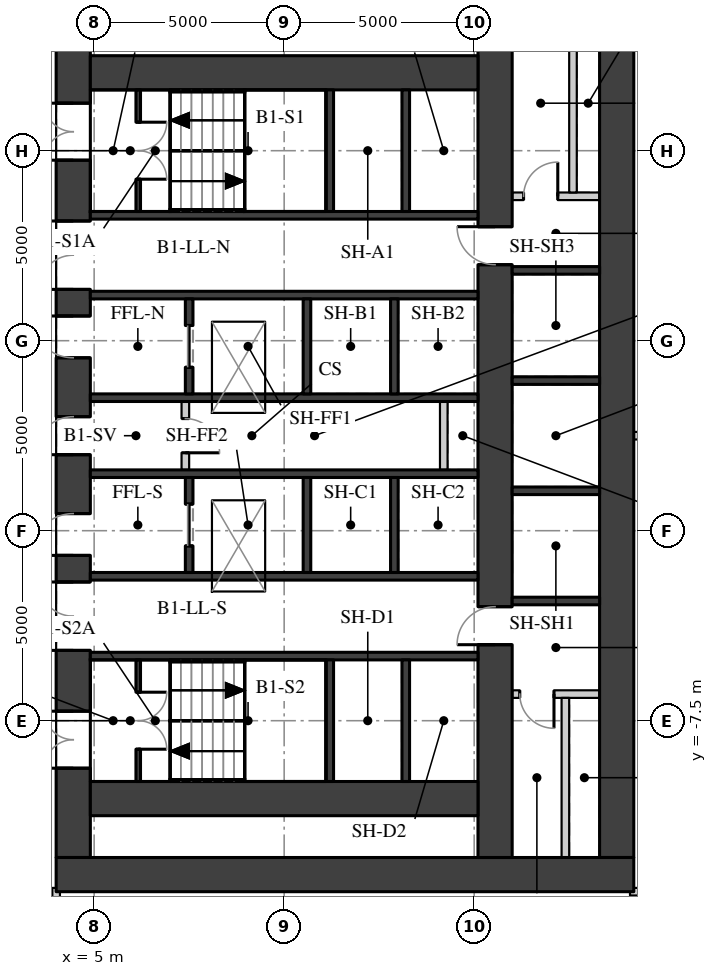
"""IFC4 building model, lengths in metres.
Left out: names, types, materials, properties, quantities, classifications, styles, units other than length and angle.
Written with IfcOpenShell. Run it as: python <this file> out.ifc"""

import sys

from ifc_helpers import new_model, si_unit, direction, frame, frame_2d, origin, place, context, subcontext, project, spatial, rectangle, extrude, element, fill, save


model = new_model("IFC4")
c1 = context("Model", 3, precision=1e-05, world=origin(), true_north=direction((0.0, 1.0)))
c2 = subcontext(c1, "Body", "Model", "MODEL_VIEW")
j1 = project(units=[si_unit("LENGTHUNIT", "METRE"), si_unit("PLANEANGLEUNIT", "RADIAN")], contexts=[c1])
p1 = place(None, origin())
s1 = spatial("IfcSite", under=j1, at=p1, CompositionType="ELEMENT")
p2 = place(p1, origin())
s2 = spatial("IfcBuilding", under=s1, at=p2, CompositionType="ELEMENT")
p3 = place(p2, frame((0.0, 0.0, -5.2)))
s3 = spatial("IfcBuildingStorey", under=s2, at=p3, CompositionType="ELEMENT", Elevation=-5.2)
p4 = place(p3, frame((4.45, -11.1, 0.0), z_axis=(0.0, 0.0, 1.0), x_axis=(0.0, 1.0, 0.0)))
e1 = element("IfcWall", 1, at=p4, inside=s3, PredefinedType="SHEAR", context=c2, shape_type="SweptSolid", body=[
    extrude(rectangle(XDim=22.2, YDim=0.9, at=frame_2d((11.1, 0.0))), origin(), (0.0, 0.0, 1.0), 4.79),
])
p5 = place(p4, frame((2.35, 0.0, 0.0)))
e2 = element("IfcOpeningElement", 2, at=p5, cuts=e1, PredefinedType="OPENING", context=c2, shape_type="SweptSolid", body=[
    extrude(rectangle(XDim=1.5, YDim=2.1, at=frame_2d((0.75, 1.05))), frame((0.0, 0.46, 0.0), z_axis=(0.0, -1.0, 0.0), x_axis=(1.0, 0.0, 0.0)), (0.0, 0.0, 1.0), 0.92),
])
p6 = place(p4, frame((5.45, 0.0, 0.0)))
e3 = element("IfcOpeningElement", 3, at=p6, cuts=e1, PredefinedType="OPENING", context=c2, shape_type="SweptSolid", body=[
    extrude(rectangle(XDim=1.8, YDim=2.1, at=frame_2d((0.9, 1.05))), frame((0.0, 0.46, 0.0), z_axis=(0.0, -1.0, 0.0), x_axis=(1.0, 0.0, 0.0)), (0.0, 0.0, 1.0), 0.92),
])
p7 = place(p4, frame((7.95, 0.0, 0.0)))
e4 = element("IfcOpeningElement", 4, at=p7, cuts=e1, PredefinedType="OPENING", context=c2, shape_type="SweptSolid", body=[
    extrude(rectangle(XDim=1.1, YDim=2.1, at=frame_2d((0.55, 1.05))), frame((0.0, 0.46, 0.0), z_axis=(0.0, -1.0, 0.0), x_axis=(1.0, 0.0, 0.0)), (0.0, 0.0, 1.0), 0.92),
])
p8 = place(p4, frame((10.6, 0.0, 0.0)))
e5 = element("IfcOpeningElement", 5, at=p8, cuts=e1, PredefinedType="OPENING", context=c2, shape_type="SweptSolid", body=[
    extrude(rectangle(XDim=1.0, YDim=2.1, at=frame_2d((0.5, 1.05))), frame((0.0, 0.46, 0.0), z_axis=(0.0, -1.0, 0.0), x_axis=(1.0, 0.0, 0.0)), (0.0, 0.0, 1.0), 0.92),
])
p9 = place(p4, frame((13.15, 0.0, 0.0)))
e6 = element("IfcOpeningElement", 6, at=p9, cuts=e1, PredefinedType="OPENING", context=c2, shape_type="SweptSolid", body=[
    extrude(rectangle(XDim=1.1, YDim=2.1, at=frame_2d((0.55, 1.05))), frame((0.0, 0.46, 0.0), z_axis=(0.0, -1.0, 0.0), x_axis=(1.0, 0.0, 0.0)), (0.0, 0.0, 1.0), 0.92),
])
p10 = place(p4, frame((14.95, 0.0, 0.0)))
e7 = element("IfcOpeningElement", 7, at=p10, cuts=e1, PredefinedType="OPENING", context=c2, shape_type="SweptSolid", body=[
    extrude(rectangle(XDim=1.8, YDim=2.1, at=frame_2d((0.9, 1.05))), frame((0.0, 0.46, 0.0), z_axis=(0.0, -1.0, 0.0), x_axis=(1.0, 0.0, 0.0)), (0.0, 0.0, 1.0), 0.92),
])
p11 = place(p4, frame((18.35, 0.0, 0.0)))
e8 = element("IfcOpeningElement", 8, at=p11, cuts=e1, PredefinedType="OPENING", context=c2, shape_type="SweptSolid", body=[
    extrude(rectangle(XDim=1.5, YDim=2.1, at=frame_2d((0.75, 1.05))), frame((0.0, 0.46, 0.0), z_axis=(0.0, -1.0, 0.0), x_axis=(1.0, 0.0, 0.0)), (0.0, 0.0, 1.0), 0.92),
])
p12 = place(p3, frame((18.75, -11.1, 0.0), z_axis=(0.0, 0.0, 1.0), x_axis=(0.0, 1.0, 0.0)))
e9 = element("IfcWall", 9, at=p12, inside=s3, PredefinedType="SHEAR", context=c2, shape_type="SweptSolid", body=[
    extrude(rectangle(XDim=22.2, YDim=0.9, at=frame_2d((11.1, 0.0))), origin(), (0.0, 0.0, 1.0), 4.79),
])
p13 = place(p3, frame((4.0, -11.55, 0.0), z_axis=(0.0, 0.0, 1.0), x_axis=(1.0, 0.0, 0.0)))
e10 = element("IfcWall", 10, at=p13, inside=s3, PredefinedType="SHEAR", context=c2, shape_type="SweptSolid", body=[
    extrude(rectangle(XDim=15.2, YDim=0.9, at=frame_2d((7.6, 0.0))), origin(), (0.0, 0.0, 1.0), 4.79),
])
p14 = place(p3, frame((15.55, -11.1, 0.0), z_axis=(0.0, 0.0, 1.0), x_axis=(0.0, 1.0, 0.0)))
e11 = element("IfcWall", 11, at=p14, inside=s3, PredefinedType="SHEAR", context=c2, shape_type="SweptSolid", body=[
    extrude(rectangle(XDim=22.2, YDim=0.9, at=frame_2d((11.1, 0.0))), origin(), (0.0, 0.0, 1.0), 4.79),
])
p15 = place(p14, frame((15.6, 0.0, 0.0)))
e12 = element("IfcOpeningElement", 12, at=p15, cuts=e11, PredefinedType="OPENING", context=c2, shape_type="SweptSolid", body=[
    extrude(rectangle(XDim=1.0, YDim=2.1, at=frame_2d((0.5, 1.05))), frame((0.0, 0.46, 0.0), z_axis=(0.0, -1.0, 0.0), x_axis=(1.0, 0.0, 0.0)), (0.0, 0.0, 1.0), 0.92),
])
p16 = place(p14, frame((5.6, 0.0, 0.0)))
e13 = element("IfcOpeningElement", 13, at=p16, cuts=e11, PredefinedType="OPENING", context=c2, shape_type="SweptSolid", body=[
    extrude(rectangle(XDim=1.0, YDim=2.1, at=frame_2d((0.5, 1.05))), frame((0.0, 0.46, 0.0), z_axis=(0.0, -1.0, 0.0), x_axis=(1.0, 0.0, 0.0)), (0.0, 0.0, 1.0), 0.92),
])
for number, where, z_axis, x_axis in (
    (14, (4.9, 9.55, 0.0), (0.0, 0.0, 1.0), (1.0, 0.0, 0.0)),
    (15, (4.9, -9.55, 0.0), (0.0, 0.0, 1.0), (1.0, 0.0, 0.0)),
):
    element("IfcWall", number, at=place(p3, frame(where, z_axis=z_axis, x_axis=x_axis)), inside=s3, PredefinedType="SHEAR", context=c2, shape_type="SweptSolid", body=[
        extrude(rectangle(XDim=10.2, YDim=0.9, at=frame_2d((5.1, 0.0))), origin(), (0.0, 0.0, 1.0), 4.79),
    ])
for number, where, z_axis, x_axis in (
    (16, (4.9, 5.8, 0.0), (0.0, 0.0, 1.0), (1.0, 0.0, 0.0)),
    (17, (4.9, 3.7, 0.0), (0.0, 0.0, 1.0), (1.0, 0.0, 0.0)),
    (18, (4.9, 1.0, 0.0), (0.0, 0.0, 1.0), (1.0, 0.0, 0.0)),
    (19, (4.9, -1.0, 0.0), (0.0, 0.0, 1.0), (1.0, 0.0, 0.0)),
    (20, (4.9, -3.7, 0.0), (0.0, 0.0, 1.0), (1.0, 0.0, 0.0)),
    (21, (4.9, -5.8, 0.0), (0.0, 0.0, 1.0), (1.0, 0.0, 0.0)),
):
    element("IfcWall", number, at=place(p3, frame(where, z_axis=z_axis, x_axis=x_axis)), inside=s3, PredefinedType="SHEAR", context=c2, shape_type="SweptSolid", body=[
        extrude(rectangle(XDim=10.2, YDim=0.2, at=frame_2d((5.1, 0.0))), origin(), (0.0, 0.0, 1.0), 4.79),
    ])
for number, where, z_axis, x_axis in (
    (22, (11.2, 5.9, 0.0), (0.0, 0.0, 1.0), (0.0, 1.0, 0.0)),
    (23, (11.2, -9.1, 0.0), (0.0, 0.0, 1.0), (0.0, 1.0, 0.0)),
    (24, (13.2, 5.9, 0.0), (0.0, 0.0, 1.0), (0.0, 1.0, 0.0)),
    (25, (13.2, -9.1, 0.0), (0.0, 0.0, 1.0), (0.0, 1.0, 0.0)),
):
    element("IfcWall", number, at=place(p3, frame(where, z_axis=z_axis, x_axis=x_axis)), inside=s3, PredefinedType="SHEAR", context=c2, shape_type="SweptSolid", body=[
        extrude(rectangle(XDim=3.2, YDim=0.2, at=frame_2d((1.6, 0.0))), origin(), (0.0, 0.0, 1.0), 4.79),
    ])
p17 = place(p3, frame((7.5, 1.1, 0.0), z_axis=(0.0, 0.0, 1.0), x_axis=(0.0, 1.0, 0.0)))
e26 = element("IfcWall", 26, at=p17, inside=s3, PredefinedType="SHEAR", context=c2, shape_type="SweptSolid", body=[
    extrude(rectangle(XDim=2.5, YDim=0.2, at=frame_2d((1.25, 0.0))), origin(), (0.0, 0.0, 1.0), 4.79),
])
p18 = place(p17, frame((0.7, 0.0, 0.0)))
e27 = element("IfcOpeningElement", 27, at=p18, cuts=e26, PredefinedType="OPENING", context=c2, shape_type="SweptSolid", body=[
    extrude(rectangle(XDim=1.1, YDim=2.1, at=frame_2d((0.55, 1.05))), frame((0.0, 0.11, 0.0), z_axis=(0.0, -1.0, 0.0), x_axis=(1.0, 0.0, 0.0)), (0.0, 0.0, 1.0), 0.22),
])
p19 = place(p3, frame((7.5, -3.6, 0.0), z_axis=(0.0, 0.0, 1.0), x_axis=(0.0, 1.0, 0.0)))
e28 = element("IfcWall", 28, at=p19, inside=s3, PredefinedType="SHEAR", context=c2, shape_type="SweptSolid", body=[
    extrude(rectangle(XDim=2.5, YDim=0.2, at=frame_2d((1.25, 0.0))), origin(), (0.0, 0.0, 1.0), 4.79),
])
p20 = place(p19, frame((0.7, 0.0, 0.0)))
e29 = element("IfcOpeningElement", 29, at=p20, cuts=e28, PredefinedType="OPENING", context=c2, shape_type="SweptSolid", body=[
    extrude(rectangle(XDim=1.1, YDim=2.1, at=frame_2d((0.55, 1.05))), frame((0.0, 0.11, 0.0), z_axis=(0.0, -1.0, 0.0), x_axis=(1.0, 0.0, 0.0)), (0.0, 0.0, 1.0), 0.22),
])
for number, where, z_axis, x_axis in (
    (30, (10.6, 1.1, 0.0), (0.0, 0.0, 1.0), (0.0, 1.0, 0.0)),
    (31, (10.6, -3.6, 0.0), (0.0, 0.0, 1.0), (0.0, 1.0, 0.0)),
    (32, (12.9, 1.1, 0.0), (0.0, 0.0, 1.0), (0.0, 1.0, 0.0)),
    (33, (12.9, -3.6, 0.0), (0.0, 0.0, 1.0), (0.0, 1.0, 0.0)),
):
    element("IfcWall", number, at=place(p3, frame(where, z_axis=z_axis, x_axis=x_axis)), inside=s3, PredefinedType="SHEAR", context=c2, shape_type="SweptSolid", body=[
        extrude(rectangle(XDim=2.5, YDim=0.2, at=frame_2d((1.25, 0.0))), origin(), (0.0, 0.0, 1.0), 4.79),
    ])
p21 = place(p3, frame((6.16, 5.9, 0.0), z_axis=(0.0, 0.0, 1.0), x_axis=(0.0, 1.0, 0.0)))
e34 = element("IfcWall", 34, at=p21, inside=s3, PredefinedType="SHEAR", context=c2, shape_type="SweptSolid", body=[
    extrude(rectangle(XDim=3.2, YDim=0.12, at=frame_2d((1.6, 0.0))), origin(), (0.0, 0.0, 1.0), 2.39),
])
p22 = place(p21, frame((0.85, 0.0, 0.0)))
e35 = element("IfcOpeningElement", 35, at=p22, cuts=e34, PredefinedType="OPENING", context=c2, shape_type="SweptSolid", body=[
    extrude(rectangle(XDim=1.5, YDim=2.1, at=frame_2d((0.75, 1.05))), frame((0.0, 0.07, 0.0), z_axis=(0.0, -1.0, 0.0), x_axis=(1.0, 0.0, 0.0)), (0.0, 0.0, 1.0), 0.14),
])
p23 = place(p3, frame((6.16, -9.1, 0.0), z_axis=(0.0, 0.0, 1.0), x_axis=(0.0, 1.0, 0.0)))
e36 = element("IfcWall", 36, at=p23, inside=s3, PredefinedType="SHEAR", context=c2, shape_type="SweptSolid", body=[
    extrude(rectangle(XDim=3.2, YDim=0.12, at=frame_2d((1.6, 0.0))), origin(), (0.0, 0.0, 1.0), 2.39),
])
p24 = place(p23, frame((0.85, 0.0, 0.0)))
e37 = element("IfcOpeningElement", 37, at=p24, cuts=e36, PredefinedType="OPENING", context=c2, shape_type="SweptSolid", body=[
    extrude(rectangle(XDim=1.5, YDim=2.1, at=frame_2d((0.75, 1.05))), frame((0.0, 0.07, 0.0), z_axis=(0.0, -1.0, 0.0), x_axis=(1.0, 0.0, 0.0)), (0.0, 0.0, 1.0), 0.14),
])
p25 = place(p3, frame((7.4, -0.9, 0.0), z_axis=(0.0, 0.0, 1.0), x_axis=(0.0, 1.0, 0.0)))
e38 = element("IfcWall", 38, at=p25, inside=s3, PredefinedType="PARTITIONING", context=c2, shape_type="SweptSolid", body=[
    extrude(rectangle(XDim=1.8, YDim=0.2, at=frame_2d((0.9, 0.0))), origin(), (0.0, 0.0, 1.0), 4.79),
])
p26 = place(p25, frame((0.45, 0.0, 0.0)))
e39 = element("IfcOpeningElement", 39, at=p26, cuts=e38, PredefinedType="OPENING", context=c2, shape_type="SweptSolid", body=[
    extrude(rectangle(XDim=0.9, YDim=2.1, at=frame_2d((0.45, 1.05))), frame((0.0, 0.11, 0.0), z_axis=(0.0, -1.0, 0.0), x_axis=(1.0, 0.0, 0.0)), (0.0, 0.0, 1.0), 0.22),
])
p27 = place(p3, frame((14.2, -0.9, 0.0), z_axis=(0.0, 0.0, 1.0), x_axis=(0.0, 1.0, 0.0)))
e40 = element("IfcWall", 40, at=p27, inside=s3, PredefinedType="PARTITIONING", context=c2, shape_type="SweptSolid", body=[
    extrude(rectangle(XDim=1.8, YDim=0.2, at=frame_2d((0.9, 0.0))), origin(), (0.0, 0.0, 1.0), 4.79),
])
for number, where, z_axis, x_axis in (
    (41, (16.0, -4.35, 0.0), (0.0, 0.0, 1.0), (1.0, 0.0, 0.0)),
    (42, (16.0, -1.45, 0.0), (0.0, 0.0, 1.0), (1.0, 0.0, 0.0)),
    (43, (16.0, 1.45, 0.0), (0.0, 0.0, 1.0), (1.0, 0.0, 0.0)),
    (44, (16.0, 4.35, 0.0), (0.0, 0.0, 1.0), (1.0, 0.0, 0.0)),
):
    element("IfcWall", number, at=place(p3, frame(where, z_axis=z_axis, x_axis=x_axis)), inside=s3, PredefinedType="SHEAR", context=c2, shape_type="SweptSolid", body=[
        extrude(rectangle(XDim=2.3, YDim=0.2, at=frame_2d((1.15, 0.0))), origin(), (0.0, 0.0, 1.0), 4.79),
    ])
p28 = place(p3, frame((16.0, 6.3, 0.0), z_axis=(0.0, 0.0, 1.0), x_axis=(1.0, 0.0, 0.0)))
e45 = element("IfcWall", 45, at=p28, inside=s3, PredefinedType="PARTITIONING", context=c2, shape_type="SweptSolid", body=[
    extrude(rectangle(XDim=2.3, YDim=0.2, at=frame_2d((1.15, 0.0))), origin(), (0.0, 0.0, 1.0), 4.79),
])
p29 = place(p28, frame((0.3, 0.0, 0.0)))
e46 = element("IfcOpeningElement", 46, at=p29, cuts=e45, PredefinedType="OPENING", context=c2, shape_type="SweptSolid", body=[
    extrude(rectangle(XDim=0.9, YDim=2.1, at=frame_2d((0.45, 1.05))), frame((0.0, 0.11, 0.0), z_axis=(0.0, -1.0, 0.0), x_axis=(1.0, 0.0, 0.0)), (0.0, 0.0, 1.0), 0.22),
])
p30 = place(p3, frame((17.6, 6.4, 0.0), z_axis=(0.0, 0.0, 1.0), x_axis=(0.0, 1.0, 0.0)))
e47 = element("IfcWall", 47, at=p30, inside=s3, PredefinedType="PARTITIONING", context=c2, shape_type="SweptSolid", body=[
    extrude(rectangle(XDim=4.7, YDim=0.2, at=frame_2d((2.35, 0.0))), origin(), (0.0, 0.0, 1.0), 4.79),
])
p31 = place(p3, frame((16.0, -6.8, 0.0), z_axis=(0.0, 0.0, 1.0), x_axis=(1.0, 0.0, 0.0)))
e48 = element("IfcWall", 48, at=p31, inside=s3, PredefinedType="PARTITIONING", context=c2, shape_type="SweptSolid", body=[
    extrude(rectangle(XDim=2.3, YDim=0.2, at=frame_2d((1.15, 0.0))), origin(), (0.0, 0.0, 1.0), 4.79),
])
p32 = place(p31, frame((0.2, 0.0, 0.0)))
e49 = element("IfcOpeningElement", 49, at=p32, cuts=e48, PredefinedType="OPENING", context=c2, shape_type="SweptSolid", body=[
    extrude(rectangle(XDim=0.9, YDim=2.1, at=frame_2d((0.45, 1.05))), frame((0.0, 0.11, 0.0), z_axis=(0.0, -1.0, 0.0), x_axis=(1.0, 0.0, 0.0)), (0.0, 0.0, 1.0), 0.22),
])
p33 = place(p3, frame((17.4, -11.1, 0.0), z_axis=(0.0, 0.0, 1.0), x_axis=(0.0, 1.0, 0.0)))
e50 = element("IfcWall", 50, at=p33, inside=s3, PredefinedType="PARTITIONING", context=c2, shape_type="SweptSolid", body=[
    extrude(rectangle(XDim=4.2, YDim=0.2, at=frame_2d((2.1, 0.0))), origin(), (0.0, 0.0, 1.0), 4.79),
])
p34 = place(p3, frame((19.1, -12.0, 0.0), z_axis=(0.0, 0.0, 1.0), x_axis=(1.0, 0.0, 0.0)))
e51 = element("IfcWall", 51, at=p34, inside=s3, PredefinedType="PARTITIONING", context=c2, shape_type="SweptSolid", body=[
    extrude(rectangle(XDim=20.625, YDim=0.2, at=frame_2d((10.312, 0.0))), origin(), (0.0, 0.0, 1.0), 3.89),
])
p35 = place(p34, frame((9.813, 0.0, 0.0)))
e52 = element("IfcOpeningElement", 52, at=p35, cuts=e51, PredefinedType="OPENING", context=c2, shape_type="SweptSolid", body=[
    extrude(rectangle(XDim=1.0, YDim=2.1, at=frame_2d((0.5, 1.05))), frame((0.0, 0.11, 0.0), z_axis=(0.0, -1.0, 0.0), x_axis=(1.0, 0.0, 0.0)), (0.0, 0.0, 1.0), 0.22),
])
p36 = place(p3, frame((19.198, 0.0, 0.0), z_axis=(0.0, 0.0, 1.0), x_axis=(1.0, 0.0, 0.0)))
e53 = element("IfcWall", 53, at=p36, inside=s3, PredefinedType="PARTITIONING", context=c2, shape_type="SweptSolid", body=[
    extrude(rectangle(XDim=23.546, YDim=0.2, at=frame_2d((11.773, 0.0))), origin(), (0.0, 0.0, 1.0), 3.79),
])
p37 = place(p3, frame((4.0, -14.9, 0.0), z_axis=(0.0, 0.0, 1.0), x_axis=(0.0, 1.0, 0.0)))
e54 = element("IfcWall", 54, at=p37, inside=s3, PredefinedType="PARTITIONING", context=c2, shape_type="SweptSolid", body=[
    extrude(rectangle(XDim=3.0, YDim=0.2, at=frame_2d((1.5, 0.0))), origin(), (0.0, 0.0, 1.0), 4.79),
])
p38 = place(p37, frame((0.9, 0.0, 0.0)))
e55 = element("IfcOpeningElement", 55, at=p38, cuts=e54, PredefinedType="OPENING", context=c2, shape_type="SweptSolid", body=[
    extrude(rectangle(XDim=1.0, YDim=2.1, at=frame_2d((0.5, 1.05))), frame((0.0, 0.11, 0.0), z_axis=(0.0, -1.0, 0.0), x_axis=(1.0, 0.0, 0.0)), (0.0, 0.0, 1.0), 0.22),
])
p39 = place(p5, origin())
e56 = element("IfcDoor", 56, at=p39, inside=s3, OperationType="DOUBLE_DOOR_SINGLE_SWING", PredefinedType="DOOR", context=c2, shape_type="SweptSolid", body=[
    extrude(rectangle(XDim=1.5, YDim=2.1, at=frame_2d((0.75, 1.05))), frame((0.0, 0.025, 0.0), z_axis=(0.0, -1.0, 0.0), x_axis=(1.0, 0.0, 0.0)), (0.0, 0.0, 1.0), 0.05),
])
fill(e2, e56)
p40 = place(p6, origin())
e57 = element("IfcDoor", 57, at=p40, inside=s3, OperationType="DOUBLE_DOOR_SINGLE_SWING", PredefinedType="DOOR", context=c2, shape_type="SweptSolid", body=[
    extrude(rectangle(XDim=1.8, YDim=2.1, at=frame_2d((0.9, 1.05))), frame((0.0, 0.025, 0.0), z_axis=(0.0, -1.0, 0.0), x_axis=(1.0, 0.0, 0.0)), (0.0, 0.0, 1.0), 0.05),
])
fill(e3, e57)
p41 = place(p7, origin())
e58 = element("IfcDoor", 58, at=p41, inside=s3, OperationType="SINGLE_SWING_LEFT", PredefinedType="DOOR", context=c2, shape_type="SweptSolid", body=[
    extrude(rectangle(XDim=1.1, YDim=2.1, at=frame_2d((0.55, 1.05))), frame((0.0, 0.025, 0.0), z_axis=(0.0, -1.0, 0.0), x_axis=(1.0, 0.0, 0.0)), (0.0, 0.0, 1.0), 0.05),
])
fill(e4, e58)
p42 = place(p8, origin())
e59 = element("IfcDoor", 59, at=p42, inside=s3, OperationType="SINGLE_SWING_LEFT", PredefinedType="DOOR", context=c2, shape_type="SweptSolid", body=[
    extrude(rectangle(XDim=1.0, YDim=2.1, at=frame_2d((0.5, 1.05))), frame((0.0, 0.025, 0.0), z_axis=(0.0, -1.0, 0.0), x_axis=(1.0, 0.0, 0.0)), (0.0, 0.0, 1.0), 0.05),
])
fill(e5, e59)
p43 = place(p9, origin())
e60 = element("IfcDoor", 60, at=p43, inside=s3, OperationType="SINGLE_SWING_RIGHT", PredefinedType="DOOR", context=c2, shape_type="SweptSolid", body=[
    extrude(rectangle(XDim=1.1, YDim=2.1, at=frame_2d((0.55, 1.05))), frame((0.0, 0.025, 0.0), z_axis=(0.0, -1.0, 0.0), x_axis=(1.0, 0.0, 0.0)), (0.0, 0.0, 1.0), 0.05),
])
fill(e6, e60)
p44 = place(p10, origin())
e61 = element("IfcDoor", 61, at=p44, inside=s3, OperationType="DOUBLE_DOOR_SINGLE_SWING", PredefinedType="DOOR", context=c2, shape_type="SweptSolid", body=[
    extrude(rectangle(XDim=1.8, YDim=2.1, at=frame_2d((0.9, 1.05))), frame((0.0, 0.025, 0.0), z_axis=(0.0, -1.0, 0.0), x_axis=(1.0, 0.0, 0.0)), (0.0, 0.0, 1.0), 0.05),
])
fill(e7, e61)
p45 = place(p11, origin())
e62 = element("IfcDoor", 62, at=p45, inside=s3, OperationType="DOUBLE_DOOR_SINGLE_SWING", PredefinedType="DOOR", context=c2, shape_type="SweptSolid", body=[
    extrude(rectangle(XDim=1.5, YDim=2.1, at=frame_2d((0.75, 1.05))), frame((0.0, 0.025, 0.0), z_axis=(0.0, -1.0, 0.0), x_axis=(1.0, 0.0, 0.0)), (0.0, 0.0, 1.0), 0.05),
])
fill(e8, e62)
p46 = place(p22, origin())
e63 = element("IfcDoor", 63, at=p46, inside=s3, OperationType="DOUBLE_DOOR_SINGLE_SWING", PredefinedType="DOOR", context=c2, shape_type="SweptSolid", body=[
    extrude(rectangle(XDim=1.5, YDim=2.1, at=frame_2d((0.75, 1.05))), frame((0.0, 0.025, 0.0), z_axis=(0.0, -1.0, 0.0), x_axis=(1.0, 0.0, 0.0)), (0.0, 0.0, 1.0), 0.05),
])
fill(e35, e63)
p47 = place(p24, origin())
e64 = element("IfcDoor", 64, at=p47, inside=s3, OperationType="DOUBLE_DOOR_SINGLE_SWING", PredefinedType="DOOR", context=c2, shape_type="SweptSolid", body=[
    extrude(rectangle(XDim=1.5, YDim=2.1, at=frame_2d((0.75, 1.05))), frame((0.0, 0.025, 0.0), z_axis=(0.0, -1.0, 0.0), x_axis=(1.0, 0.0, 0.0)), (0.0, 0.0, 1.0), 0.05),
])
fill(e37, e64)
p48 = place(p18, origin())
e65 = element("IfcDoor", 65, at=p48, inside=s3, OperationType="DOUBLE_DOOR_SLIDING", PredefinedType="DOOR", context=c2, shape_type="SweptSolid", body=[
    extrude(rectangle(XDim=1.1, YDim=2.1, at=frame_2d((0.55, 1.05))), frame((0.0, 0.025, 0.0), z_axis=(0.0, -1.0, 0.0), x_axis=(1.0, 0.0, 0.0)), (0.0, 0.0, 1.0), 0.05),
])
fill(e27, e65)
p49 = place(p20, origin())
e66 = element("IfcDoor", 66, at=p49, inside=s3, OperationType="DOUBLE_DOOR_SLIDING", PredefinedType="DOOR", context=c2, shape_type="SweptSolid", body=[
    extrude(rectangle(XDim=1.1, YDim=2.1, at=frame_2d((0.55, 1.05))), frame((0.0, 0.025, 0.0), z_axis=(0.0, -1.0, 0.0), x_axis=(1.0, 0.0, 0.0)), (0.0, 0.0, 1.0), 0.05),
])
fill(e29, e66)
p50 = place(p26, origin())
e67 = element("IfcDoor", 67, at=p50, inside=s3, OperationType="SINGLE_SWING_RIGHT", PredefinedType="DOOR", context=c2, shape_type="SweptSolid", body=[
    extrude(rectangle(XDim=0.9, YDim=2.1, at=frame_2d((0.45, 1.05))), frame((0.0, 0.025, 0.0), z_axis=(0.0, -1.0, 0.0), x_axis=(1.0, 0.0, 0.0)), (0.0, 0.0, 1.0), 0.05),
])
fill(e39, e67)
p51 = place(p15, origin())
e68 = element("IfcDoor", 68, at=p51, inside=s3, OperationType="SINGLE_SWING_RIGHT", PredefinedType="DOOR", context=c2, shape_type="SweptSolid", body=[
    extrude(rectangle(XDim=1.0, YDim=2.1, at=frame_2d((0.5, 1.05))), frame((0.0, 0.025, 0.0), z_axis=(0.0, -1.0, 0.0), x_axis=(1.0, 0.0, 0.0)), (0.0, 0.0, 1.0), 0.05),
])
fill(e12, e68)
p52 = place(p29, origin())
e69 = element("IfcDoor", 69, at=p52, inside=s3, OperationType="SINGLE_SWING_RIGHT", PredefinedType="DOOR", context=c2, shape_type="SweptSolid", body=[
    extrude(rectangle(XDim=0.9, YDim=2.1, at=frame_2d((0.45, 1.05))), frame((0.0, 0.025, 0.0), z_axis=(0.0, -1.0, 0.0), x_axis=(1.0, 0.0, 0.0)), (0.0, 0.0, 1.0), 0.05),
])
fill(e46, e69)
p53 = place(p16, origin())
e70 = element("IfcDoor", 70, at=p53, inside=s3, OperationType="SINGLE_SWING_LEFT", PredefinedType="DOOR", context=c2, shape_type="SweptSolid", body=[
    extrude(rectangle(XDim=1.0, YDim=2.1, at=frame_2d((0.5, 1.05))), frame((0.0, 0.025, 0.0), z_axis=(0.0, -1.0, 0.0), x_axis=(1.0, 0.0, 0.0)), (0.0, 0.0, 1.0), 0.05),
])
fill(e13, e70)
p54 = place(p32, origin())
e71 = element("IfcDoor", 71, at=p54, inside=s3, OperationType="SINGLE_SWING_LEFT", PredefinedType="DOOR", context=c2, shape_type="SweptSolid", body=[
    extrude(rectangle(XDim=0.9, YDim=2.1, at=frame_2d((0.45, 1.05))), frame((0.0, 0.025, 0.0), z_axis=(0.0, -1.0, 0.0), x_axis=(1.0, 0.0, 0.0)), (0.0, 0.0, 1.0), 0.05),
])
fill(e49, e71)
save(model, sys.argv[1])
